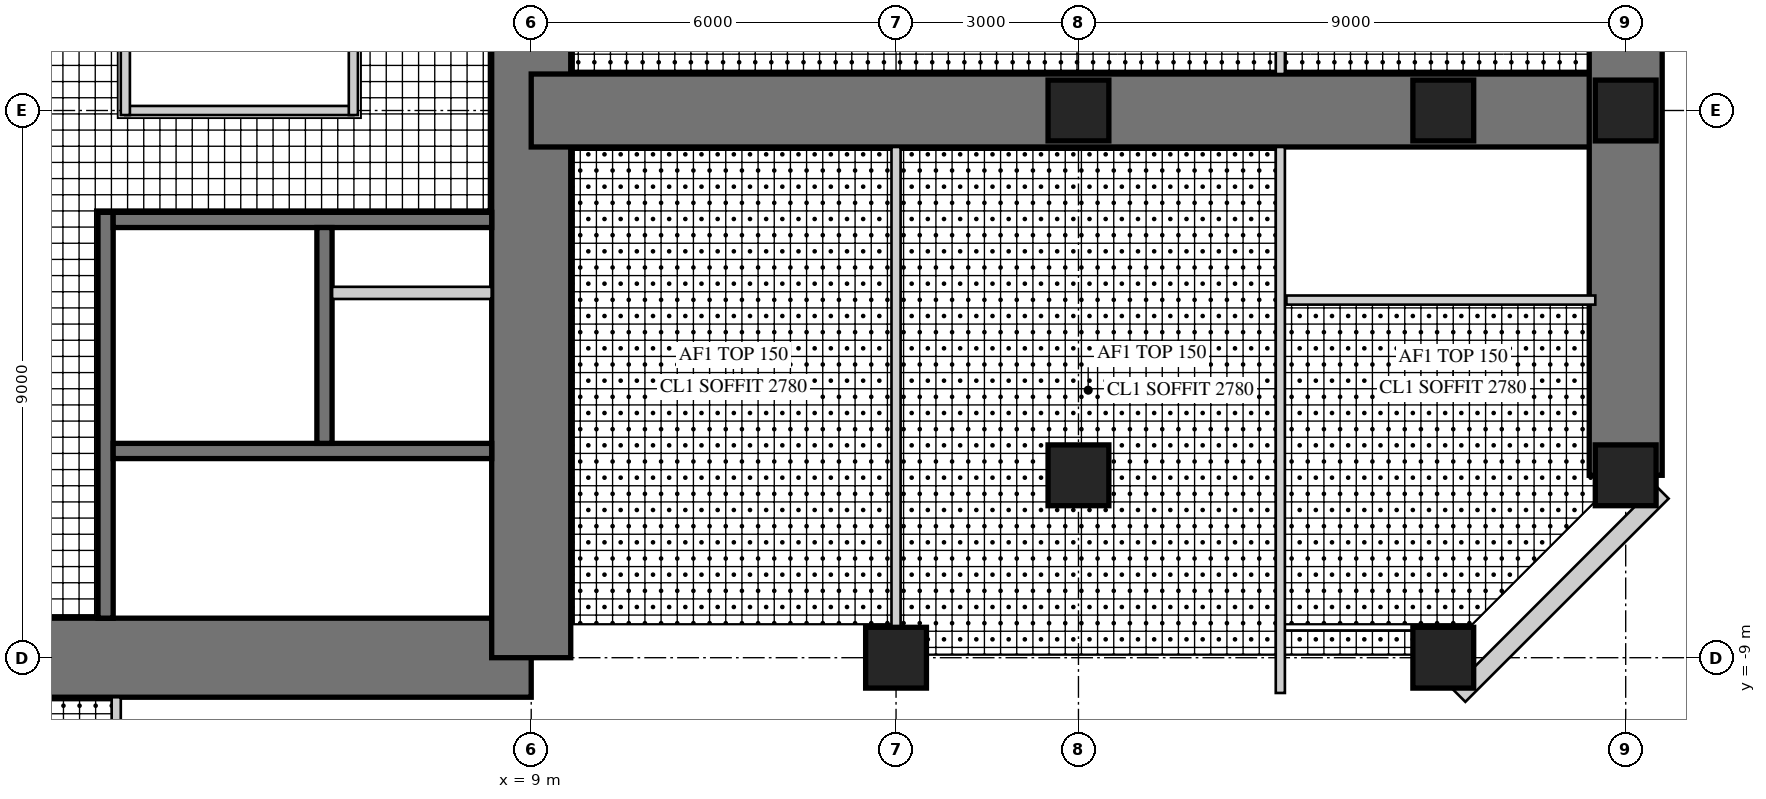
"""IFC4 building model, lengths in metres.
Left out: names, types, materials, properties, quantities, classifications, styles, units other than length and angle.
Written with IfcOpenShell. Run it as: python <this file> out.ifc"""

import sys

from ifc_helpers import new_model, si_unit, direction, frame, frame_2d, origin, origin_2d, place, context, subcontext, project, spatial, rectangle, hollow_rectangle, extrude, element, fill, save


model = new_model("IFC4")
c1 = context("Model", 3, precision=1e-05, world=origin(), true_north=direction((0.0, 1.0)))
c2 = subcontext(c1, "Body", "Model", "MODEL_VIEW")
j1 = project(units=[si_unit("LENGTHUNIT", "METRE"), si_unit("PLANEANGLEUNIT", "RADIAN")], contexts=[c1])
p1 = place(None, origin())
s1 = spatial("IfcSite", under=j1, at=p1, CompositionType="ELEMENT")
p2 = place(p1, origin())
s2 = spatial("IfcBuilding", under=s1, at=p2, CompositionType="ELEMENT")
p3 = place(p2, frame((0.0, 0.0, 104.5)))
s3 = spatial("IfcBuildingStorey", under=s2, at=p3, CompositionType="ELEMENT", Elevation=104.5)
p4 = place(p3, frame((-9.0, -9.0, 0.0), z_axis=(0.0, 0.0, 1.0), x_axis=(1.0, 0.0, 0.0)))
e1 = element("IfcWall", 1, at=p4, inside=s3, PredefinedType="SHEAR", context=c2, shape_type="SweptSolid", body=[
    extrude(rectangle(XDim=18.0, YDim=1.3, at=frame_2d((9.0, 0.0))), origin(), (0.0, 0.0, 1.0), 4.0),
])
p5 = place(p4, frame((9.8, 0.0, 0.0)))
e2 = element("IfcOpeningElement", 2, at=p5, cuts=e1, PredefinedType="OPENING", context=c2, shape_type="SweptSolid", body=[
    extrude(rectangle(XDim=1.0, YDim=2.4, at=frame_2d((0.5, 1.2))), frame((0.0, 0.66, 0.0), z_axis=(0.0, -1.0, 0.0), x_axis=(1.0, 0.0, 0.0)), (0.0, 0.0, 1.0), 1.32),
])
p6 = place(p3, frame((9.0, -9.0, 0.0), z_axis=(0.0, 0.0, 1.0), x_axis=(0.0, 1.0, 0.0)))
e3 = element("IfcWall", 3, at=p6, inside=s3, PredefinedType="SHEAR", context=c2, shape_type="SweptSolid", body=[
    extrude(rectangle(XDim=18.0, YDim=1.3, at=frame_2d((9.0, 0.0))), origin(), (0.0, 0.0, 1.0), 4.0),
])
p7 = place(p6, frame((9.8, 0.0, 0.0)))
e4 = element("IfcOpeningElement", 4, at=p7, cuts=e3, PredefinedType="OPENING", context=c2, shape_type="SweptSolid", body=[
    extrude(rectangle(XDim=1.0, YDim=2.4, at=frame_2d((0.5, 1.2))), frame((0.0, 0.66, 0.0), z_axis=(0.0, -1.0, 0.0), x_axis=(1.0, 0.0, 0.0)), (0.0, 0.0, 1.0), 1.32),
])
p8 = place(p3, frame((2.0, -1.675, 0.0), z_axis=(0.0, 0.0, 1.0), x_axis=(0.0, -1.0, 0.0)))
e5 = element("IfcWall", 5, at=p8, inside=s3, PredefinedType="SHEAR", context=c2, shape_type="SweptSolid", body=[
    extrude(rectangle(XDim=6.675, YDim=0.25, at=frame_2d((3.337, 0.0))), origin(), (0.0, 0.0, 1.0), 4.0),
])
p9 = place(p8, frame((0.725, 0.0, 0.0)))
e6 = element("IfcOpeningElement", 6, at=p9, cuts=e5, PredefinedType="OPENING", context=c2, shape_type="SweptSolid", body=[
    extrude(rectangle(XDim=1.0, YDim=2.1, at=frame_2d((0.5, 1.05))), frame((0.0, 0.135, 0.0), z_axis=(0.0, -1.0, 0.0), x_axis=(1.0, 0.0, 0.0)), (0.0, 0.0, 1.0), 0.27),
])
p10 = place(p3, frame((2.125, -1.8, 0.0), z_axis=(0.0, 0.0, 1.0), x_axis=(1.0, 0.0, 0.0)))
e7 = element("IfcWall", 7, at=p10, inside=s3, PredefinedType="SHEAR", context=c2, shape_type="SweptSolid", body=[
    extrude(rectangle(XDim=6.225, YDim=0.25, at=frame_2d((3.113, 0.0))), origin(), (0.0, 0.0, 1.0), 4.0),
])
p11 = place(p3, frame((2.125, -5.6, 0.0), z_axis=(0.0, 0.0, 1.0), x_axis=(1.0, 0.0, 0.0)))
e8 = element("IfcWall", 8, at=p11, inside=s3, PredefinedType="SHEAR", context=c2, shape_type="SweptSolid", body=[
    extrude(rectangle(XDim=6.225, YDim=0.25, at=frame_2d((3.113, 0.0))), origin(), (0.0, 0.0, 1.0), 4.0),
])
p12 = place(p11, frame((0.175, 0.0, 0.0)))
e9 = element("IfcOpeningElement", 9, at=p12, cuts=e8, PredefinedType="OPENING", context=c2, shape_type="SweptSolid", body=[
    extrude(rectangle(XDim=1.0, YDim=2.1, at=frame_2d((0.5, 1.05))), frame((0.0, 0.135, 0.0), z_axis=(0.0, -1.0, 0.0), x_axis=(1.0, 0.0, 0.0)), (0.0, 0.0, 1.0), 0.27),
])
p13 = place(p3, frame((5.6, -1.925, 0.0), z_axis=(0.0, 0.0, 1.0), x_axis=(0.0, -1.0, 0.0)))
e10 = element("IfcWall", 10, at=p13, inside=s3, PredefinedType="SHEAR", context=c2, shape_type="SweptSolid", body=[
    extrude(rectangle(XDim=3.55, YDim=0.25, at=frame_2d((1.775, 0.0))), origin(), (0.0, 0.0, 1.0), 4.0),
])
p14 = place(p13, frame((1.525, 0.0, 0.0)))
e11 = element("IfcOpeningElement", 11, at=p14, cuts=e10, PredefinedType="OPENING", context=c2, shape_type="SweptSolid", body=[
    extrude(rectangle(XDim=1.1, YDim=2.2, at=frame_2d((0.55, 1.1))), frame((0.0, 0.135, 0.0), z_axis=(0.0, -1.0, 0.0), x_axis=(1.0, 0.0, 0.0)), (0.0, 0.0, 1.0), 0.27),
])
p15 = place(p13, frame((0.075, 0.0, 0.0)))
e12 = element("IfcOpeningElement", 12, at=p15, cuts=e10, PredefinedType="OPENING", context=c2, shape_type="SweptSolid", body=[
    extrude(rectangle(XDim=0.8, YDim=2.1, at=frame_2d((0.4, 1.05))), frame((0.0, 0.135, 0.0), z_axis=(0.0, -1.0, 0.0), x_axis=(1.0, 0.0, 0.0)), (0.0, 0.0, 1.0), 0.27),
])
p16 = place(p3, frame((5.725, -3.0, 0.0), z_axis=(0.0, 0.0, 1.0), x_axis=(1.0, 0.0, 0.0)))
e13 = element("IfcWall", 13, at=p16, inside=s3, PredefinedType="PARTITIONING", context=c2, shape_type="SweptSolid", body=[
    extrude(rectangle(XDim=2.625, YDim=0.2, at=frame_2d((1.312, 0.0))), origin(), (0.0, 0.0, 1.0), 4.0),
])
p17 = place(p3, frame((9.0, 0.0, 0.0), z_axis=(0.0, 0.0, 1.0), x_axis=(1.0, 0.0, 0.0)))
e14 = element("IfcWall", 14, at=p17, inside=s3, PredefinedType="SHEAR", context=c2, shape_type="SweptSolid", body=[
    extrude(rectangle(XDim=18.0, YDim=1.2, at=frame_2d((9.0, 0.0))), origin(), (0.0, 0.0, 1.0), 4.0),
])
p18 = place(p17, frame((9.8, 0.0, 0.0)))
e15 = element("IfcOpeningElement", 15, at=p18, cuts=e14, PredefinedType="OPENING", context=c2, shape_type="SweptSolid", body=[
    extrude(rectangle(XDim=1.0, YDim=2.2, at=frame_2d((0.5, 1.1))), frame((0.0, 0.61, 0.0), z_axis=(0.0, -1.0, 0.0), x_axis=(1.0, 0.0, 0.0)), (0.0, 0.0, 1.0), 1.22),
])
p19 = place(p3, frame((27.0, -6.0, 0.0), z_axis=(0.0, 0.0, 1.0), x_axis=(0.0, 1.0, 0.0)))
e16 = element("IfcWall", 16, at=p19, inside=s3, PredefinedType="SHEAR", context=c2, shape_type="SweptSolid", body=[
    extrude(rectangle(XDim=12.0, YDim=1.2, at=frame_2d((6.0, 0.0))), origin(), (0.0, 0.0, 1.0), 4.0),
])
p20 = place(p19, frame((1.55, 0.0, 0.6)))
e17 = element("IfcOpeningElement", 17, at=p20, cuts=e16, PredefinedType="OPENING", context=c2, shape_type="SweptSolid", body=[
    extrude(rectangle(XDim=3.0, YDim=2.4, at=frame_2d((1.5, 1.2))), frame((0.0, 0.61, 0.0), z_axis=(0.0, -1.0, 0.0), x_axis=(1.0, 0.0, 0.0)), (0.0, 0.0, 1.0), 1.22),
])
p21 = place(p19, frame((7.45, 0.0, 0.6)))
e18 = element("IfcOpeningElement", 18, at=p21, cuts=e16, PredefinedType="OPENING", context=c2, shape_type="SweptSolid", body=[
    extrude(rectangle(XDim=3.0, YDim=2.4, at=frame_2d((1.5, 1.2))), frame((0.0, 0.61, 0.0), z_axis=(0.0, -1.0, 0.0), x_axis=(1.0, 0.0, 0.0)), (0.0, 0.0, 1.0), 1.22),
])
for number, where, z_axis, x_axis in (
    (19, (15.0, -9.0, 0.0), (0.0, 0.0, 1.0), (1.0, 0.0, 0.0)),
    (20, (24.0, -9.0, 0.0), (0.0, 0.0, 1.0), (1.0, 0.0, 0.0)),
    (21, (27.0, -6.0, 0.0), (0.0, 0.0, 1.0), (1.0, 0.0, 0.0)),
    (22, (27.0, 0.0, 0.0), (0.0, 0.0, 1.0), (1.0, 0.0, 0.0)),
    (23, (18.0, -6.0, 0.0), (0.0, 0.0, 1.0), (1.0, 0.0, 0.0)),
    (24, (18.0, 0.0, 0.0), (0.0, 0.0, 1.0), (1.0, 0.0, 0.0)),
    (25, (24.0, 0.0, 0.0), (0.0, 0.0, 1.0), (1.0, 0.0, 0.0)),
):
    element("IfcColumn", number, at=place(p3, frame(where, z_axis=z_axis, x_axis=x_axis)), inside=s3, PredefinedType="COLUMN", context=c2, shape_type="SweptSolid", body=[
        extrude(rectangle(XDim=1.0, YDim=1.0, at=origin_2d()), origin(), (0.0, 0.0, 1.0), 4.0),
    ])
p22 = place(p3, frame((24.257, -9.62, 0.0), z_axis=(0.0, 0.0, 1.0), x_axis=(0.707106781187, 0.707106781187, 0.0)))
e26 = element("IfcWall", 26, at=p22, inside=s3, PredefinedType="SOLIDWALL", context=c2, shape_type="SweptSolid", body=[
    extrude(rectangle(XDim=4.728, YDim=0.3, at=frame_2d((2.364, 0.0))), origin(), (0.0, 0.0, 1.0), 3.8),
])
p23 = place(p22, frame((1.914, 0.0, 0.3)))
e27 = element("IfcOpeningElement", 27, at=p23, cuts=e26, PredefinedType="OPENING", context=c2, shape_type="SweptSolid", body=[
    extrude(rectangle(XDim=0.9, YDim=2.4, at=frame_2d((0.45, 1.2))), frame((0.0, 0.16, 0.0), z_axis=(0.0, -1.0, 0.0), x_axis=(1.0, 0.0, 0.0)), (0.0, 0.0, 1.0), 0.32),
])
p24 = place(p3, frame((2.325, 0.0, 0.0), z_axis=(0.0, 0.0, 1.0), x_axis=(1.0, 0.0, 0.0)))
e28 = element("IfcWall", 28, at=p24, inside=s3, PredefinedType="PARTITIONING", context=c2, shape_type="SweptSolid", body=[
    extrude(rectangle(XDim=3.75, YDim=0.15, at=frame_2d((1.875, 0.0))), origin(), (0.0, 0.0, 1.0), 3.8),
])
p25 = place(p24, frame((0.4, 0.0, 0.0)))
e29 = element("IfcOpeningElement", 29, at=p25, cuts=e28, PredefinedType="OPENING", context=c2, shape_type="SweptSolid", body=[
    extrude(rectangle(XDim=1.0, YDim=2.1, at=frame_2d((0.5, 1.05))), frame((0.0, 0.085, 0.0), z_axis=(0.0, -1.0, 0.0), x_axis=(1.0, 0.0, 0.0)), (0.0, 0.0, 1.0), 0.17),
])
for number, where, z_axis, x_axis in (
    (30, (2.325, 1.875, 0.0), (0.0, 0.0, 1.0), (0.0, -1.0, 0.0)),
    (31, (6.075, -0.075, 0.0), (0.0, 0.0, 1.0), (0.0, 1.0, 0.0)),
):
    element("IfcWall", number, at=place(p3, frame(where, z_axis=z_axis, x_axis=x_axis)), inside=s3, PredefinedType="PARTITIONING", context=c2, shape_type="SweptSolid", body=[
        extrude(rectangle(XDim=1.95, YDim=0.15, at=frame_2d((0.975, 0.0))), origin(), (0.0, 0.0, 1.0), 3.8),
    ])
p26 = place(p3, frame((15.0, -8.5, 0.0), z_axis=(0.0, 0.0, 1.0), x_axis=(0.0, 1.0, 0.0)))
e32 = element("IfcWall", 32, at=p26, inside=s3, PredefinedType="PARTITIONING", context=c2, shape_type="SweptSolid", body=[
    extrude(rectangle(XDim=7.9, YDim=0.15, at=frame_2d((3.95, 0.0))), origin(), (0.0, 0.0, 1.0), 3.0),
])
p27 = place(p26, frame((3.45, 0.0, 0.0)))
e33 = element("IfcOpeningElement", 33, at=p27, cuts=e32, PredefinedType="OPENING", context=c2, shape_type="SweptSolid", body=[
    extrude(rectangle(XDim=1.0, YDim=2.1, at=frame_2d((0.5, 1.05))), frame((0.0, 0.085, 0.0), z_axis=(0.0, -1.0, 0.0), x_axis=(1.0, 0.0, 0.0)), (0.0, 0.0, 1.0), 0.17),
])
p28 = place(p3, frame((21.32, 0.6, 0.0), z_axis=(0.0, 0.0, 1.0), x_axis=(0.0, 1.0, 0.0)))
e34 = element("IfcWall", 34, at=p28, inside=s3, PredefinedType="PARTITIONING", context=c2, shape_type="SweptSolid", body=[
    extrude(rectangle(XDim=8.98, YDim=0.15, at=frame_2d((4.49, 0.0))), origin(), (0.0, 0.0, 1.0), 3.8),
])
p29 = place(p28, frame((0.45, 0.0, 0.0)))
e35 = element("IfcOpeningElement", 35, at=p29, cuts=e34, PredefinedType="OPENING", context=c2, shape_type="SweptSolid", body=[
    extrude(rectangle(XDim=1.0, YDim=2.2, at=frame_2d((0.5, 1.1))), frame((0.0, 0.085, 0.0), z_axis=(0.0, -1.0, 0.0), x_axis=(1.0, 0.0, 0.0)), (0.0, 0.0, 1.0), 0.17),
])
p30 = place(p3, frame((21.42, -3.118, 0.0), z_axis=(0.0, 0.0, 1.0), x_axis=(1.0, 0.0, 0.0)))
e36 = element("IfcWall", 36, at=p30, inside=s3, PredefinedType="PARTITIONING", context=c2, shape_type="SweptSolid", body=[
    extrude(rectangle(XDim=5.08, YDim=0.15, at=frame_2d((2.54, 0.0))), origin(), (0.0, 0.0, 1.0), 3.8),
])
p31 = place(p3, frame((21.32, -9.58, 0.0), z_axis=(0.0, 0.0, 1.0), x_axis=(0.0, 1.0, 0.0)))
e37 = element("IfcWall", 37, at=p31, inside=s3, PredefinedType="PARTITIONING", context=c2, shape_type="SweptSolid", body=[
    extrude(rectangle(XDim=8.98, YDim=0.15, at=frame_2d((4.49, 0.0))), origin(), (0.0, 0.0, 1.0), 3.8),
])
p32 = place(p31, frame((4.987, 0.0, 0.0)))
e38 = element("IfcOpeningElement", 38, at=p32, cuts=e37, PredefinedType="OPENING", context=c2, shape_type="SweptSolid", body=[
    extrude(rectangle(XDim=1.0, YDim=2.2, at=frame_2d((0.5, 1.1))), frame((0.0, 0.085, 0.0), z_axis=(0.0, -1.0, 0.0), x_axis=(1.0, 0.0, 0.0)), (0.0, 0.0, 1.0), 0.17),
])
p33 = place(p31, frame((7.63, 0.0, 0.0)))
e39 = element("IfcOpeningElement", 39, at=p33, cuts=e37, PredefinedType="OPENING", context=c2, shape_type="SweptSolid", body=[
    extrude(rectangle(XDim=1.0, YDim=2.2, at=frame_2d((0.5, 1.1))), frame((0.0, 0.085, 0.0), z_axis=(0.0, -1.0, 0.0), x_axis=(1.0, 0.0, 0.0)), (0.0, 0.0, 1.0), 0.17),
])
p34 = place(p3, frame((2.175, -9.65, 0.0), z_axis=(0.0, 0.0, 1.0), x_axis=(0.0, -1.0, 0.0)))
e40 = element("IfcWall", 40, at=p34, inside=s3, PredefinedType="PARTITIONING", context=c2, shape_type="SweptSolid", body=[
    extrude(rectangle(XDim=5.35, YDim=0.15, at=frame_2d((2.675, 0.0))), origin(), (0.0, 0.0, 1.0), 3.8),
])
p35 = place(p23, origin())
e41 = element("IfcWindow", 41, at=p35, inside=s3, PartitioningType="SINGLE_PANEL", PredefinedType="WINDOW", context=c2, shape_type="SweptSolid", body=[
    extrude(hollow_rectangle(XDim=0.9, YDim=2.4, WallThickness=0.06, at=frame_2d((0.45, 1.2))), frame((0.0, 0.03, 0.0), z_axis=(0.0, -1.0, 0.0), x_axis=(1.0, 0.0, 0.0)), (0.0, 0.0, 1.0), 0.06),
    extrude(rectangle(XDim=0.779, YDim=2.279, at=frame_2d((0.45, 1.2))), frame((0.0, 0.03, 0.0), z_axis=(0.0, -1.0, 0.0), x_axis=(1.0, 0.0, 0.0)), (0.0, 0.0, 1.0), 0.06),
])
fill(e27, e41)
p36 = place(p20, origin())
e42 = element("IfcWindow", 42, at=p36, inside=s3, PartitioningType="SINGLE_PANEL", PredefinedType="WINDOW", context=c2, shape_type="SweptSolid", body=[
    extrude(hollow_rectangle(XDim=3.0, YDim=2.4, WallThickness=0.06, at=frame_2d((1.5, 1.2))), frame((0.0, 0.03, 0.0), z_axis=(0.0, -1.0, 0.0), x_axis=(1.0, 0.0, 0.0)), (0.0, 0.0, 1.0), 0.06),
    extrude(rectangle(XDim=2.879, YDim=2.279, at=frame_2d((1.5, 1.2))), frame((0.0, 0.03, 0.0), z_axis=(0.0, -1.0, 0.0), x_axis=(1.0, 0.0, 0.0)), (0.0, 0.0, 1.0), 0.06),
])
fill(e17, e42)
p37 = place(p25, origin())
e43 = element("IfcDoor", 43, at=p37, inside=s3, OperationType="SINGLE_SWING_LEFT", PredefinedType="DOOR", context=c2, shape_type="SweptSolid", body=[
    extrude(rectangle(XDim=1.0, YDim=2.1, at=frame_2d((0.5, 1.05))), frame((0.0, 0.025, 0.0), z_axis=(0.0, -1.0, 0.0), x_axis=(1.0, 0.0, 0.0)), (0.0, 0.0, 1.0), 0.05),
])
fill(e29, e43)
p38 = place(p27, origin())
e44 = element("IfcDoor", 44, at=p38, inside=s3, OperationType="SINGLE_SWING_RIGHT", PredefinedType="DOOR", context=c2, shape_type="SweptSolid", body=[
    extrude(rectangle(XDim=1.0, YDim=2.1, at=frame_2d((0.5, 1.05))), frame((0.0, 0.025, 0.0), z_axis=(0.0, -1.0, 0.0), x_axis=(1.0, 0.0, 0.0)), (0.0, 0.0, 1.0), 0.05),
])
fill(e33, e44)
p39 = place(p32, frame((1.0, 0.0, 0.0), z_axis=(0.0, 0.0, 1.0), x_axis=(-1.0, 0.0, 0.0)))
e45 = element("IfcDoor", 45, at=p39, inside=s3, OperationType="SINGLE_SWING_LEFT", PredefinedType="DOOR", context=c2, shape_type="SweptSolid", body=[
    extrude(rectangle(XDim=1.0, YDim=2.2, at=frame_2d((0.5, 1.1))), frame((0.0, 0.025, 0.0), z_axis=(0.0, -1.0, 0.0), x_axis=(1.0, 0.0, 0.0)), (0.0, 0.0, 1.0), 0.05),
])
fill(e38, e45)
p40 = place(p33, frame((1.0, 0.0, 0.0), z_axis=(0.0, 0.0, 1.0), x_axis=(-1.0, 0.0, 0.0)))
e46 = element("IfcDoor", 46, at=p40, inside=s3, OperationType="SINGLE_SWING_LEFT", PredefinedType="DOOR", context=c2, shape_type="SweptSolid", body=[
    extrude(rectangle(XDim=1.0, YDim=2.2, at=frame_2d((0.5, 1.1))), frame((0.0, 0.025, 0.0), z_axis=(0.0, -1.0, 0.0), x_axis=(1.0, 0.0, 0.0)), (0.0, 0.0, 1.0), 0.05),
])
fill(e39, e46)
p41 = place(p18, frame((1.0, 0.0, 0.0), z_axis=(0.0, 0.0, 1.0), x_axis=(-1.0, 0.0, 0.0)))
e47 = element("IfcDoor", 47, at=p41, inside=s3, OperationType="SINGLE_SWING_LEFT", PredefinedType="DOOR", context=c2, shape_type="SweptSolid", body=[
    extrude(rectangle(XDim=1.0, YDim=2.2, at=frame_2d((0.5, 1.1))), frame((0.0, 0.025, 0.0), z_axis=(0.0, -1.0, 0.0), x_axis=(1.0, 0.0, 0.0)), (0.0, 0.0, 1.0), 0.05),
])
fill(e15, e47)
p42 = place(p5, frame((1.0, 0.0, 0.0), z_axis=(0.0, 0.0, 1.0), x_axis=(-1.0, 0.0, 0.0)))
e48 = element("IfcDoor", 48, at=p42, inside=s3, OperationType="SINGLE_SWING_RIGHT", PredefinedType="DOOR", context=c2, shape_type="SweptSolid", body=[
    extrude(rectangle(XDim=1.0, YDim=2.4, at=frame_2d((0.5, 1.2))), frame((0.0, -0.005, 0.0), z_axis=(0.0, -1.0, 0.0), x_axis=(1.0, 0.0, 0.0)), (0.0, 0.0, 1.0), 0.05),
])
fill(e2, e48)
p43 = place(p7, frame((1.0, 0.0, 0.0), z_axis=(0.0, 0.0, 1.0), x_axis=(-1.0, 0.0, 0.0)))
e49 = element("IfcDoor", 49, at=p43, inside=s3, OperationType="SINGLE_SWING_RIGHT", PredefinedType="DOOR", context=c2, shape_type="SweptSolid", body=[
    extrude(rectangle(XDim=1.0, YDim=2.4, at=frame_2d((0.5, 1.2))), frame((0.0, -0.005, 0.0), z_axis=(0.0, -1.0, 0.0), x_axis=(1.0, 0.0, 0.0)), (0.0, 0.0, 1.0), 0.05),
])
fill(e4, e49)
p44 = place(p9, origin())
e50 = element("IfcDoor", 50, at=p44, inside=s3, OperationType="SINGLE_SWING_LEFT", PredefinedType="DOOR", context=c2, shape_type="SweptSolid", body=[
    extrude(rectangle(XDim=1.0, YDim=2.1, at=frame_2d((0.5, 1.05))), frame((0.0, 0.025, 0.0), z_axis=(0.0, -1.0, 0.0), x_axis=(1.0, 0.0, 0.0)), (0.0, 0.0, 1.0), 0.05),
])
fill(e6, e50)
p45 = place(p12, frame((1.0, 0.0, 0.0), z_axis=(0.0, 0.0, 1.0), x_axis=(-1.0, 0.0, 0.0)))
e51 = element("IfcDoor", 51, at=p45, inside=s3, OperationType="SINGLE_SWING_RIGHT", PredefinedType="DOOR", context=c2, shape_type="SweptSolid", body=[
    extrude(rectangle(XDim=1.0, YDim=2.1, at=frame_2d((0.5, 1.05))), frame((0.0, 0.025, 0.0), z_axis=(0.0, -1.0, 0.0), x_axis=(1.0, 0.0, 0.0)), (0.0, 0.0, 1.0), 0.05),
])
fill(e9, e51)
p46 = place(p14, origin())
e52 = element("IfcDoor", 52, at=p46, inside=s3, OperationType="DOUBLE_DOOR_SLIDING", PredefinedType="DOOR", context=c2, shape_type="SweptSolid", body=[
    extrude(rectangle(XDim=1.1, YDim=2.2, at=frame_2d((0.55, 1.1))), frame((0.0, 0.025, 0.0), z_axis=(0.0, -1.0, 0.0), x_axis=(1.0, 0.0, 0.0)), (0.0, 0.0, 1.0), 0.05),
])
fill(e11, e52)
p47 = place(p15, origin())
e53 = element("IfcDoor", 53, at=p47, inside=s3, OperationType="SINGLE_SWING_LEFT", PredefinedType="DOOR", context=c2, shape_type="SweptSolid", body=[
    extrude(rectangle(XDim=0.8, YDim=2.1, at=frame_2d((0.4, 1.05))), frame((0.0, 0.025, 0.0), z_axis=(0.0, -1.0, 0.0), x_axis=(1.0, 0.0, 0.0)), (0.0, 0.0, 1.0), 0.05),
])
fill(e12, e53)
save(model, sys.argv[1])
